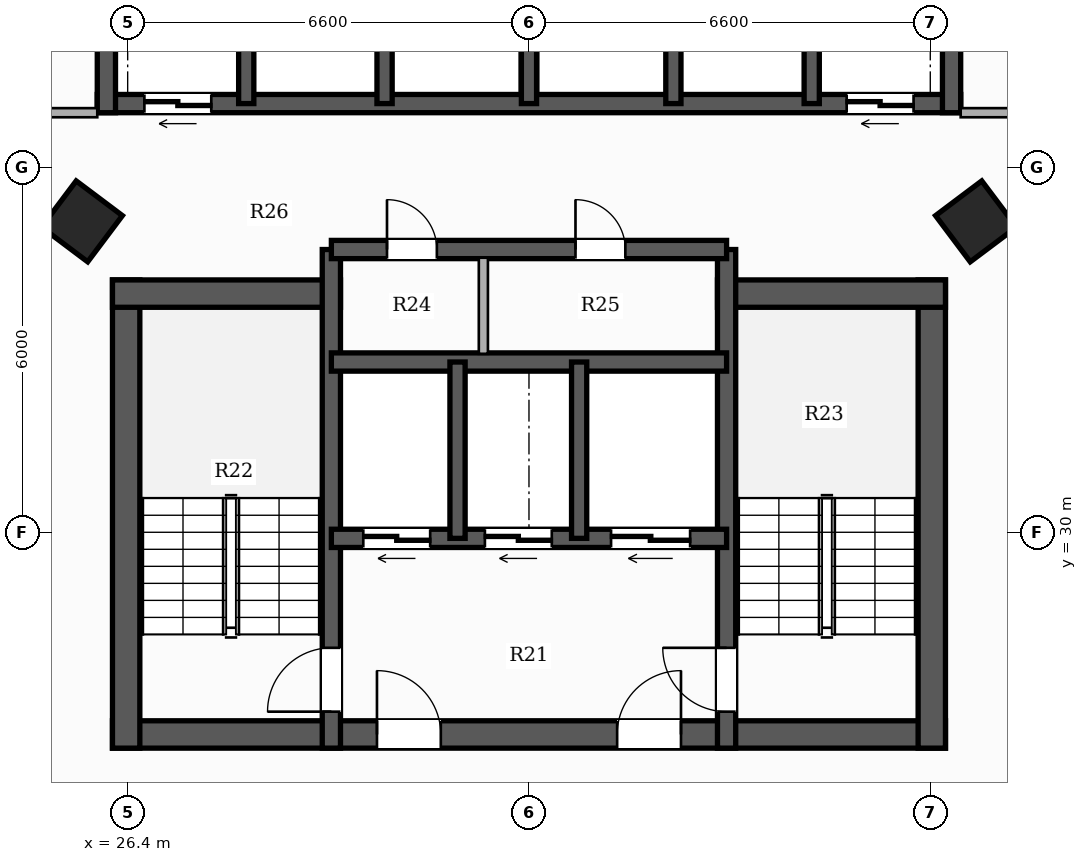
"""IFC4 building model, lengths in metres.
Left out: names, types, materials, properties, quantities, classifications, styles, units other than length and angle.
Written with IfcOpenShell. Run it as: python <this file> out.ifc"""

import sys

from ifc_helpers import new_model, si_unit, direction, frame, frame_2d, origin, origin_2d, place, context, subcontext, project, spatial, rectangle, hollow_rectangle, extrude, element, fill, save


model = new_model("IFC4")
c1 = context("Model", 3, precision=1e-05, world=origin(), true_north=direction((0.0, 1.0)))
c2 = subcontext(c1, "Body", "Model", "MODEL_VIEW")
j1 = project(units=[si_unit("LENGTHUNIT", "METRE"), si_unit("PLANEANGLEUNIT", "RADIAN")], contexts=[c1])
p1 = place(None, origin())
s1 = spatial("IfcSite", under=j1, at=p1, CompositionType="ELEMENT")
p2 = place(p1, origin())
s2 = spatial("IfcBuilding", under=s1, at=p2, CompositionType="ELEMENT")
p3 = place(p2, frame((0.0, 0.0, 56.6)))
s3 = spatial("IfcBuildingStorey", under=s2, at=p3, CompositionType="ELEMENT", Elevation=56.6)
p4 = place(p3, frame((26.15, 26.675, 0.0), z_axis=(0.0, 0.0, 1.0), x_axis=(1.0, 0.0, 0.0)))
e1 = element("IfcWall", 1, at=p4, inside=s3, PredefinedType="SHEAR", context=c2, shape_type="SweptSolid", body=[
    extrude(rectangle(XDim=13.7, YDim=0.45, at=frame_2d((6.85, 0.0))), origin(), (0.0, 0.0, 1.0), 3.3),
])
p5 = place(p4, frame((4.35, 0.0, 0.0)))
e2 = element("IfcOpeningElement", 2, at=p5, cuts=e1, PredefinedType="OPENING", context=c2, shape_type="SweptSolid", body=[
    extrude(rectangle(XDim=1.05, YDim=2.15, at=frame_2d((0.525, 1.075))), frame((0.0, 0.235, 0.0), z_axis=(0.0, -1.0, 0.0), x_axis=(1.0, 0.0, 0.0)), (0.0, 0.0, 1.0), 0.47),
])
p6 = place(p4, frame((8.3, 0.0, 0.0)))
e3 = element("IfcOpeningElement", 3, at=p6, cuts=e1, PredefinedType="OPENING", context=c2, shape_type="SweptSolid", body=[
    extrude(rectangle(XDim=1.05, YDim=2.15, at=frame_2d((0.525, 1.075))), frame((0.0, 0.235, 0.0), z_axis=(0.0, -1.0, 0.0), x_axis=(1.0, 0.0, 0.0)), (0.0, 0.0, 1.0), 0.47),
])
p7 = place(p3, frame((26.375, 26.45, 0.0), z_axis=(0.0, 0.0, 1.0), x_axis=(0.0, 1.0, 0.0)))
e4 = element("IfcWall", 4, at=p7, inside=s3, PredefinedType="SHEAR", context=c2, shape_type="SweptSolid", body=[
    extrude(rectangle(XDim=7.7, YDim=0.45, at=frame_2d((3.85, 0.0))), origin(), (0.0, 0.0, 1.0), 3.3),
])
p8 = place(p3, frame((26.15, 33.925, 0.0), z_axis=(0.0, 0.0, 1.0), x_axis=(1.0, 0.0, 0.0)))
e5 = element("IfcWall", 5, at=p8, inside=s3, PredefinedType="SHEAR", context=c2, shape_type="SweptSolid", body=[
    extrude(rectangle(XDim=3.75, YDim=0.45, at=frame_2d((1.875, 0.0))), origin(), (0.0, 0.0, 1.0), 3.3),
])
p9 = place(p3, frame((39.625, 26.45, 0.0), z_axis=(0.0, 0.0, 1.0), x_axis=(0.0, 1.0, 0.0)))
e6 = element("IfcWall", 6, at=p9, inside=s3, PredefinedType="SHEAR", context=c2, shape_type="SweptSolid", body=[
    extrude(rectangle(XDim=7.7, YDim=0.45, at=frame_2d((3.85, 0.0))), origin(), (0.0, 0.0, 1.0), 3.3),
])
p10 = place(p3, frame((36.1, 33.925, 0.0), z_axis=(0.0, 0.0, 1.0), x_axis=(1.0, 0.0, 0.0)))
e7 = element("IfcWall", 7, at=p10, inside=s3, PredefinedType="SHEAR", context=c2, shape_type="SweptSolid", body=[
    extrude(rectangle(XDim=3.75, YDim=0.45, at=frame_2d((1.875, 0.0))), origin(), (0.0, 0.0, 1.0), 3.3),
])
p11 = place(p3, frame((29.75, 26.45, 0.0), z_axis=(0.0, 0.0, 1.0), x_axis=(0.0, 1.0, 0.0)))
e8 = element("IfcWall", 8, at=p11, inside=s3, PredefinedType="SHEAR", context=c2, shape_type="SweptSolid", body=[
    extrude(rectangle(XDim=8.2, YDim=0.3, at=frame_2d((4.1, 0.0))), origin(), (0.0, 0.0, 1.0), 3.3),
])
p12 = place(p11, frame((0.6, 0.0, 0.0)))
e9 = element("IfcOpeningElement", 9, at=p12, cuts=e8, PredefinedType="OPENING", context=c2, shape_type="SweptSolid", body=[
    extrude(rectangle(XDim=1.05, YDim=2.15, at=frame_2d((0.525, 1.075))), frame((0.0, 0.16, 0.0), z_axis=(0.0, -1.0, 0.0), x_axis=(1.0, 0.0, 0.0)), (0.0, 0.0, 1.0), 0.32),
])
p13 = place(p3, frame((36.25, 26.45, 0.0), z_axis=(0.0, 0.0, 1.0), x_axis=(0.0, 1.0, 0.0)))
e10 = element("IfcWall", 10, at=p13, inside=s3, PredefinedType="SHEAR", context=c2, shape_type="SweptSolid", body=[
    extrude(rectangle(XDim=8.2, YDim=0.3, at=frame_2d((4.1, 0.0))), origin(), (0.0, 0.0, 1.0), 3.3),
])
p14 = place(p13, frame((0.6, 0.0, 0.0)))
e11 = element("IfcOpeningElement", 11, at=p14, cuts=e10, PredefinedType="OPENING", context=c2, shape_type="SweptSolid", body=[
    extrude(rectangle(XDim=1.05, YDim=2.15, at=frame_2d((0.525, 1.075))), frame((0.0, 0.16, 0.0), z_axis=(0.0, -1.0, 0.0), x_axis=(1.0, 0.0, 0.0)), (0.0, 0.0, 1.0), 0.32),
])
p15 = place(p3, frame((36.25, 29.9, 0.0), z_axis=(0.0, 0.0, 1.0), x_axis=(-1.0, 0.0, 0.0)))
e12 = element("IfcWall", 12, at=p15, inside=s3, PredefinedType="SHEAR", context=c2, shape_type="SweptSolid", body=[
    extrude(rectangle(XDim=6.5, YDim=0.3, at=frame_2d((3.25, 0.0))), origin(), (0.0, 0.0, 1.0), 3.3),
])
p16 = place(p15, frame((4.875, 0.0, 0.0)))
e13 = element("IfcOpeningElement", 13, at=p16, cuts=e12, PredefinedType="OPENING", context=c2, shape_type="SweptSolid", body=[
    extrude(rectangle(XDim=1.1, YDim=2.2, at=frame_2d((0.55, 1.1))), frame((0.0, 0.16, 0.0), z_axis=(0.0, -1.0, 0.0), x_axis=(1.0, 0.0, 0.0)), (0.0, 0.0, 1.0), 0.32),
])
p17 = place(p15, frame((2.875, 0.0, 0.0)))
e14 = element("IfcOpeningElement", 14, at=p17, cuts=e12, PredefinedType="OPENING", context=c2, shape_type="SweptSolid", body=[
    extrude(rectangle(XDim=1.1, YDim=2.2, at=frame_2d((0.55, 1.1))), frame((0.0, 0.16, 0.0), z_axis=(0.0, -1.0, 0.0), x_axis=(1.0, 0.0, 0.0)), (0.0, 0.0, 1.0), 0.32),
])
p18 = place(p15, frame((0.6, 0.0, 0.0)))
e15 = element("IfcOpeningElement", 15, at=p18, cuts=e12, PredefinedType="OPENING", context=c2, shape_type="SweptSolid", body=[
    extrude(rectangle(XDim=1.3, YDim=2.2, at=frame_2d((0.65, 1.1))), frame((0.0, 0.16, 0.0), z_axis=(0.0, -1.0, 0.0), x_axis=(1.0, 0.0, 0.0)), (0.0, 0.0, 1.0), 0.32),
])
p19 = place(p3, frame((29.75, 32.8, 0.0), z_axis=(0.0, 0.0, 1.0), x_axis=(1.0, 0.0, 0.0)))
e16 = element("IfcWall", 16, at=p19, inside=s3, PredefinedType="SHEAR", context=c2, shape_type="SweptSolid", body=[
    extrude(rectangle(XDim=6.5, YDim=0.3, at=frame_2d((3.25, 0.0))), origin(), (0.0, 0.0, 1.0), 3.3),
])
for number, where, z_axis, x_axis in (
    (17, (31.825, 29.9, 0.0), (0.0, 0.0, 1.0), (0.0, 1.0, 0.0)),
    (18, (33.825, 29.9, 0.0), (0.0, 0.0, 1.0), (0.0, 1.0, 0.0)),
):
    element("IfcWall", number, at=place(p3, frame(where, z_axis=z_axis, x_axis=x_axis)), inside=s3, PredefinedType="SHEAR", context=c2, shape_type="SweptSolid", body=[
        extrude(rectangle(XDim=2.9, YDim=0.25, at=frame_2d((1.45, 0.0))), origin(), (0.0, 0.0, 1.0), 3.3),
    ])
p20 = place(p3, frame((29.75, 34.65, 0.0), z_axis=(0.0, 0.0, 1.0), x_axis=(1.0, 0.0, 0.0)))
e19 = element("IfcWall", 19, at=p20, inside=s3, PredefinedType="SHEAR", context=c2, shape_type="SweptSolid", body=[
    extrude(rectangle(XDim=6.5, YDim=0.3, at=frame_2d((3.25, 0.0))), origin(), (0.0, 0.0, 1.0), 3.3),
])
p21 = place(p20, frame((0.915, 0.0, 0.0)))
e20 = element("IfcOpeningElement", 20, at=p21, cuts=e19, PredefinedType="OPENING", context=c2, shape_type="SweptSolid", body=[
    extrude(rectangle(XDim=0.82, YDim=2.1, at=frame_2d((0.41, 1.05))), frame((0.0, 0.16, 0.0), z_axis=(0.0, -1.0, 0.0), x_axis=(1.0, 0.0, 0.0)), (0.0, 0.0, 1.0), 0.32),
])
p22 = place(p20, frame((4.015, 0.0, 0.0)))
e21 = element("IfcOpeningElement", 21, at=p22, cuts=e19, PredefinedType="OPENING", context=c2, shape_type="SweptSolid", body=[
    extrude(rectangle(XDim=0.82, YDim=2.1, at=frame_2d((0.41, 1.05))), frame((0.0, 0.16, 0.0), z_axis=(0.0, -1.0, 0.0), x_axis=(1.0, 0.0, 0.0)), (0.0, 0.0, 1.0), 0.32),
])
p23 = place(p3, frame((40.1, 37.05, 0.0), z_axis=(0.0, 0.0, 1.0), x_axis=(-1.0, 0.0, 0.0)))
e22 = element("IfcWall", 22, at=p23, inside=s3, PredefinedType="SHEAR", context=c2, shape_type="SweptSolid", body=[
    extrude(rectangle(XDim=14.2, YDim=0.3, at=frame_2d((7.1, 0.0))), origin(), (0.0, 0.0, 1.0), 3.3),
])
p24 = place(p23, frame((12.325, 0.0, 0.0)))
e23 = element("IfcOpeningElement", 23, at=p24, cuts=e22, PredefinedType="OPENING", context=c2, shape_type="SweptSolid", body=[
    extrude(rectangle(XDim=1.1, YDim=2.2, at=frame_2d((0.55, 1.1))), frame((0.0, 0.16, 0.0), z_axis=(0.0, -1.0, 0.0), x_axis=(1.0, 0.0, 0.0)), (0.0, 0.0, 1.0), 0.32),
])
p25 = place(p23, frame((0.775, 0.0, 0.0)))
e24 = element("IfcOpeningElement", 24, at=p25, cuts=e22, PredefinedType="OPENING", context=c2, shape_type="SweptSolid", body=[
    extrude(rectangle(XDim=1.1, YDim=2.2, at=frame_2d((0.55, 1.1))), frame((0.0, 0.16, 0.0), z_axis=(0.0, -1.0, 0.0), x_axis=(1.0, 0.0, 0.0)), (0.0, 0.0, 1.0), 0.32),
])
for number, where, z_axis, x_axis in (
    (25, (26.05, 36.9, 0.0), (0.0, 0.0, 1.0), (0.0, 1.0, 0.0)),
    (26, (39.95, 36.9, 0.0), (0.0, 0.0, 1.0), (0.0, 1.0, 0.0)),
):
    element("IfcWall", number, at=place(p3, frame(where, z_axis=z_axis, x_axis=x_axis)), inside=s3, PredefinedType="SHEAR", context=c2, shape_type="SweptSolid", body=[
        extrude(rectangle(XDim=2.85, YDim=0.3, at=frame_2d((1.425, 0.0))), origin(), (0.0, 0.0, 1.0), 3.3),
    ])
for number, where, z_axis, x_axis in (
    (27, (28.35, 37.05, 0.0), (0.0, 0.0, 1.0), (0.0, 1.0, 0.0)),
    (28, (30.625, 37.05, 0.0), (0.0, 0.0, 1.0), (0.0, 1.0, 0.0)),
    (29, (33.0, 37.05, 0.0), (0.0, 0.0, 1.0), (0.0, 1.0, 0.0)),
    (30, (35.375, 37.05, 0.0), (0.0, 0.0, 1.0), (0.0, 1.0, 0.0)),
    (31, (37.65, 37.05, 0.0), (0.0, 0.0, 1.0), (0.0, 1.0, 0.0)),
):
    element("IfcWall", number, at=place(p3, frame(where, z_axis=z_axis, x_axis=x_axis)), inside=s3, PredefinedType="SHEAR", context=c2, shape_type="SweptSolid", body=[
        extrude(rectangle(XDim=2.55, YDim=0.25, at=frame_2d((1.275, 0.0))), origin(), (0.0, 0.0, 1.0), 3.3),
    ])
for number, where, z_axis, x_axis in (
    (32, (25.648, 35.113, 0.0), (0.0, 0.0, 1.0), (0.6, 0.8, 0.0)),
    (33, (40.352, 35.113, 0.0), (0.0, 0.0, 1.0), (-0.6, 0.8, 0.0)),
):
    element("IfcColumn", number, at=place(p3, frame(where, z_axis=z_axis, x_axis=x_axis)), inside=s3, PredefinedType="COLUMN", context=c2, shape_type="SweptSolid", body=[
        extrude(hollow_rectangle(XDim=0.95, YDim=0.95, WallThickness=0.032, at=origin_2d()), origin(), (0.0, 0.0, 1.0), 3.3),
    ])
p26 = place(p3, frame((32.25, 32.935, 0.0), z_axis=(0.0, 0.0, 1.0), x_axis=(0.0, 1.0, 0.0)))
e34 = element("IfcWall", 34, at=p26, inside=s3, PredefinedType="PARTITIONING", context=c2, shape_type="SweptSolid", body=[
    extrude(rectangle(XDim=1.58, YDim=0.15, at=frame_2d((0.79, 0.0))), origin(), (0.0, 0.0, 1.0), 3.02),
])
p27 = place(p3, frame((40.1, 36.9, 0.0), z_axis=(0.0, 0.0, 1.0), x_axis=(1.0, 0.0, 0.0)))
e35 = element("IfcWall", 35, at=p27, inside=s3, PredefinedType="PARTITIONING", context=c2, shape_type="SweptSolid", body=[
    extrude(rectangle(XDim=2.55, YDim=0.15, at=frame_2d((1.275, 0.0))), origin(), (0.0, 0.0, 1.0), 2.373),
])
p28 = place(p3, frame((23.41, 36.9, 0.0), z_axis=(0.0, 0.0, 1.0), x_axis=(1.0, 0.0, 0.0)))
e36 = element("IfcWall", 36, at=p28, inside=s3, PredefinedType="PARTITIONING", context=c2, shape_type="SweptSolid", body=[
    extrude(rectangle(XDim=2.49, YDim=0.15, at=frame_2d((1.245, 0.0))), origin(), (0.0, 0.0, 1.0), 2.373),
])
p29 = place(p12, origin())
e37 = element("IfcDoor", 37, at=p29, inside=s3, OperationType="SINGLE_SWING_LEFT", PredefinedType="DOOR", context=c2, shape_type="SweptSolid", body=[
    extrude(rectangle(XDim=1.05, YDim=2.15, at=frame_2d((0.525, 1.075))), frame((0.0, 0.025, 0.0), z_axis=(0.0, -1.0, 0.0), x_axis=(1.0, 0.0, 0.0)), (0.0, 0.0, 1.0), 0.05),
])
fill(e9, e37)
p30 = place(p14, origin())
e38 = element("IfcDoor", 38, at=p30, inside=s3, OperationType="SINGLE_SWING_RIGHT", PredefinedType="DOOR", context=c2, shape_type="SweptSolid", body=[
    extrude(rectangle(XDim=1.05, YDim=2.15, at=frame_2d((0.525, 1.075))), frame((0.0, 0.025, 0.0), z_axis=(0.0, -1.0, 0.0), x_axis=(1.0, 0.0, 0.0)), (0.0, 0.0, 1.0), 0.05),
])
fill(e11, e38)
p31 = place(p5, origin())
e39 = element("IfcDoor", 39, at=p31, inside=s3, OperationType="SINGLE_SWING_LEFT", PredefinedType="DOOR", context=c2, shape_type="SweptSolid", body=[
    extrude(rectangle(XDim=1.05, YDim=2.15, at=frame_2d((0.525, 1.075))), frame((0.0, 0.025, 0.0), z_axis=(0.0, -1.0, 0.0), x_axis=(1.0, 0.0, 0.0)), (0.0, 0.0, 1.0), 0.05),
])
fill(e2, e39)
p32 = place(p6, origin())
e40 = element("IfcDoor", 40, at=p32, inside=s3, OperationType="SINGLE_SWING_RIGHT", PredefinedType="DOOR", context=c2, shape_type="SweptSolid", body=[
    extrude(rectangle(XDim=1.05, YDim=2.15, at=frame_2d((0.525, 1.075))), frame((0.0, 0.025, 0.0), z_axis=(0.0, -1.0, 0.0), x_axis=(1.0, 0.0, 0.0)), (0.0, 0.0, 1.0), 0.05),
])
fill(e3, e40)
p33 = place(p16, origin())
e41 = element("IfcDoor", 41, at=p33, inside=s3, OperationType="DOUBLE_DOOR_SLIDING", PredefinedType="DOOR", context=c2, shape_type="SweptSolid", body=[
    extrude(rectangle(XDim=1.1, YDim=2.2, at=frame_2d((0.55, 1.1))), frame((0.0, 0.025, 0.0), z_axis=(0.0, -1.0, 0.0), x_axis=(1.0, 0.0, 0.0)), (0.0, 0.0, 1.0), 0.05),
])
fill(e13, e41)
p34 = place(p17, origin())
e42 = element("IfcDoor", 42, at=p34, inside=s3, OperationType="DOUBLE_DOOR_SLIDING", PredefinedType="DOOR", context=c2, shape_type="SweptSolid", body=[
    extrude(rectangle(XDim=1.1, YDim=2.2, at=frame_2d((0.55, 1.1))), frame((0.0, 0.025, 0.0), z_axis=(0.0, -1.0, 0.0), x_axis=(1.0, 0.0, 0.0)), (0.0, 0.0, 1.0), 0.05),
])
fill(e14, e42)
p35 = place(p18, origin())
e43 = element("IfcDoor", 43, at=p35, inside=s3, OperationType="DOUBLE_DOOR_SLIDING", PredefinedType="DOOR", context=c2, shape_type="SweptSolid", body=[
    extrude(rectangle(XDim=1.3, YDim=2.2, at=frame_2d((0.65, 1.1))), frame((0.0, 0.025, 0.0), z_axis=(0.0, -1.0, 0.0), x_axis=(1.0, 0.0, 0.0)), (0.0, 0.0, 1.0), 0.05),
])
fill(e15, e43)
p36 = place(p24, origin())
e44 = element("IfcDoor", 44, at=p36, inside=s3, OperationType="DOUBLE_DOOR_SLIDING", PredefinedType="DOOR", context=c2, shape_type="SweptSolid", body=[
    extrude(rectangle(XDim=1.1, YDim=2.2, at=frame_2d((0.55, 1.1))), frame((0.0, 0.025, 0.0), z_axis=(0.0, -1.0, 0.0), x_axis=(1.0, 0.0, 0.0)), (0.0, 0.0, 1.0), 0.05),
])
fill(e23, e44)
p37 = place(p25, origin())
e45 = element("IfcDoor", 45, at=p37, inside=s3, OperationType="DOUBLE_DOOR_SLIDING", PredefinedType="DOOR", context=c2, shape_type="SweptSolid", body=[
    extrude(rectangle(XDim=1.1, YDim=2.2, at=frame_2d((0.55, 1.1))), frame((0.0, 0.025, 0.0), z_axis=(0.0, -1.0, 0.0), x_axis=(1.0, 0.0, 0.0)), (0.0, 0.0, 1.0), 0.05),
])
fill(e24, e45)
p38 = place(p21, origin())
e46 = element("IfcDoor", 46, at=p38, inside=s3, OperationType="SINGLE_SWING_LEFT", PredefinedType="DOOR", context=c2, shape_type="SweptSolid", body=[
    extrude(rectangle(XDim=0.82, YDim=2.1, at=frame_2d((0.41, 1.05))), frame((0.0, 0.025, 0.0), z_axis=(0.0, -1.0, 0.0), x_axis=(1.0, 0.0, 0.0)), (0.0, 0.0, 1.0), 0.05),
])
fill(e20, e46)
p39 = place(p22, origin())
e47 = element("IfcDoor", 47, at=p39, inside=s3, OperationType="SINGLE_SWING_LEFT", PredefinedType="DOOR", context=c2, shape_type="SweptSolid", body=[
    extrude(rectangle(XDim=0.82, YDim=2.1, at=frame_2d((0.41, 1.05))), frame((0.0, 0.025, 0.0), z_axis=(0.0, -1.0, 0.0), x_axis=(1.0, 0.0, 0.0)), (0.0, 0.0, 1.0), 0.05),
])
fill(e21, e47)
save(model, sys.argv[1])
